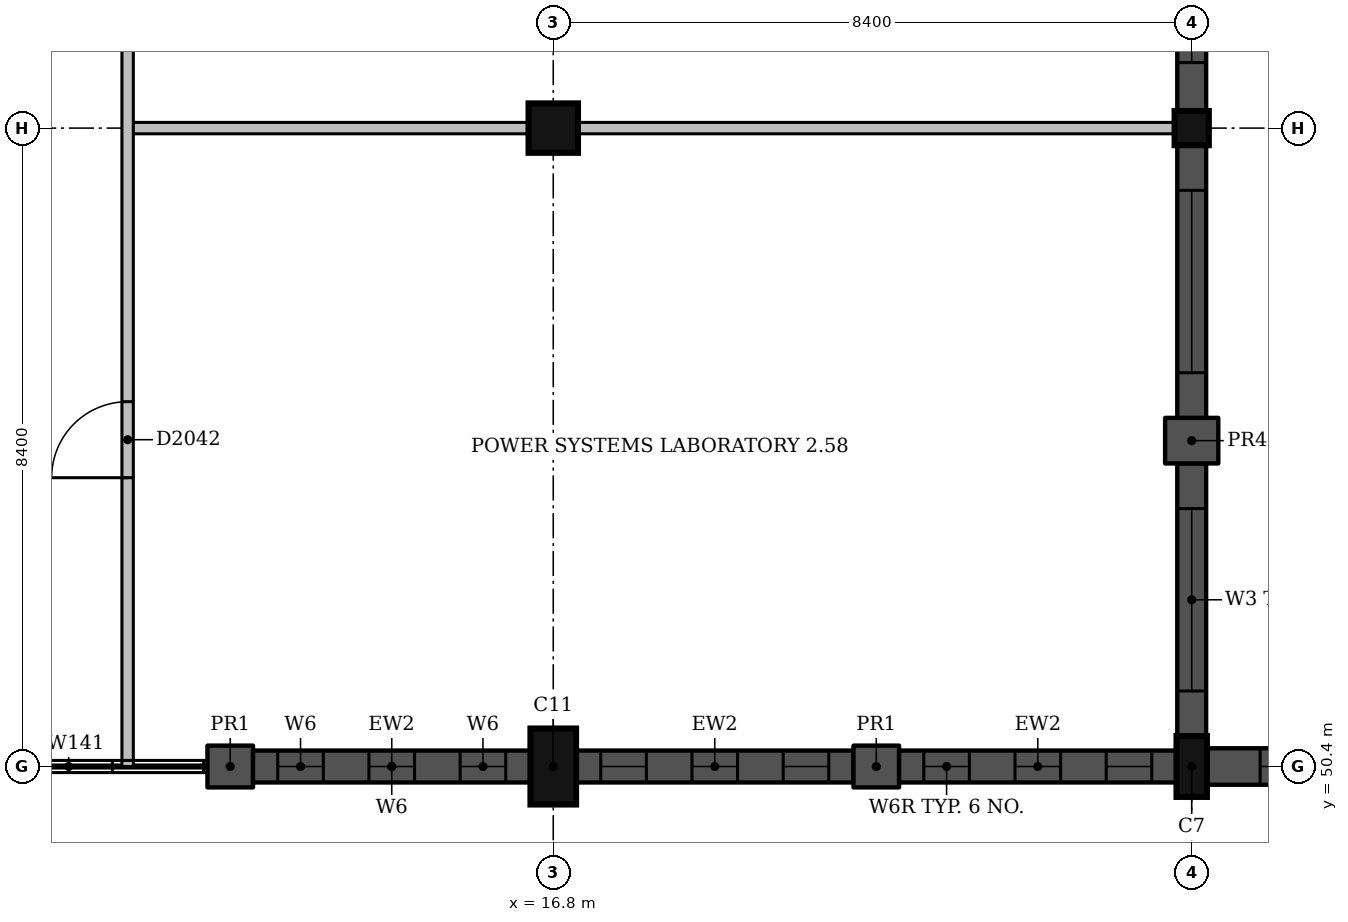
"""IFC4 building model, lengths in metres.
Left out: names, types, materials, properties, quantities, classifications, styles, units other than length and angle.
Written with IfcOpenShell. Run it as: python <this file> out.ifc"""

import sys

from ifc_helpers import new_model, si_unit, direction, frame, frame_2d, origin, origin_2d, place, context, subcontext, project, spatial, rectangle, extrude, element, fill, save


model = new_model("IFC4")
c1 = context("Model", 3, precision=1e-05, world=origin(), true_north=direction((0.0, 1.0)))
c2 = subcontext(c1, "Body", "Model", "MODEL_VIEW")
j1 = project(units=[si_unit("LENGTHUNIT", "METRE"), si_unit("PLANEANGLEUNIT", "RADIAN")], contexts=[c1])
p1 = place(None, origin())
s1 = spatial("IfcSite", under=j1, at=p1, CompositionType="ELEMENT")
p2 = place(p1, origin())
s2 = spatial("IfcBuilding", under=s1, at=p2, CompositionType="ELEMENT")
p3 = place(p2, frame((0.0, 0.0, 9.0)))
s3 = spatial("IfcBuildingStorey", under=s2, at=p3, CompositionType="ELEMENT", Elevation=9.0)
p4 = place(p3, frame((16.8, 50.4, 0.0), z_axis=(0.0, 0.0, 1.0), x_axis=(1.0, 0.0, 0.0)))
e1 = element("IfcColumn", 1, at=p4, inside=s3, PredefinedType="COLUMN", context=c2, shape_type="SweptSolid", body=[
    extrude(rectangle(XDim=0.6, YDim=1.0, at=origin_2d()), origin(), (0.0, 0.0, 1.0), 4.5),
])
p5 = place(p3, frame((25.2, 50.4, 0.0), z_axis=(0.0, 0.0, 1.0), x_axis=(1.0, 0.0, 0.0)))
e2 = element("IfcColumn", 2, at=p5, inside=s3, PredefinedType="COLUMN", context=c2, shape_type="SweptSolid", body=[
    extrude(rectangle(XDim=0.4, YDim=0.8, at=origin_2d()), origin(), (0.0, 0.0, 1.0), 4.5),
])
p6 = place(p3, frame((16.8, 58.8, 0.0), z_axis=(0.0, 0.0, 1.0), x_axis=(1.0, 0.0, 0.0)))
e3 = element("IfcColumn", 3, at=p6, inside=s3, PredefinedType="COLUMN", context=c2, shape_type="SweptSolid", body=[
    extrude(rectangle(XDim=0.65, YDim=0.65, at=origin_2d()), origin(), (0.0, 0.0, 1.0), 4.5),
])
p7 = place(p3, frame((25.2, 58.8, 0.0), z_axis=(0.0, 0.0, 1.0), x_axis=(1.0, 0.0, 0.0)))
e4 = element("IfcColumn", 4, at=p7, inside=s3, PredefinedType="COLUMN", context=c2, shape_type="SweptSolid", body=[
    extrude(rectangle(XDim=0.45, YDim=0.45, at=origin_2d()), origin(), (0.0, 0.0, 1.0), 4.5),
])
p8 = place(p3, frame((25.2, 50.8, 0.0), z_axis=(0.0, 0.0, 1.0), x_axis=(0.0, 1.0, 0.0)))
e5 = element("IfcWall", 5, at=p8, inside=s3, PredefinedType="SOLIDWALL", context=c2, shape_type="SweptSolid", body=[
    extrude(rectangle(XDim=3.587, YDim=0.38, at=frame_2d((1.794, 0.0))), origin(), (0.0, 0.0, 1.0), 4.2),
])
p9 = place(p8, frame((0.594, 0.0, 1.2)))
e6 = element("IfcOpeningElement", 6, at=p9, cuts=e5, PredefinedType="OPENING", context=c2, shape_type="SweptSolid", body=[
    extrude(rectangle(XDim=2.4, YDim=1.5, at=frame_2d((1.2, 0.75))), frame((0.0, 0.2, 0.0), z_axis=(0.0, -1.0, 0.0), x_axis=(1.0, 0.0, 0.0)), (0.0, 0.0, 1.0), 0.4),
])
p10 = place(p3, frame((25.2, 54.387, 0.0), z_axis=(0.0, 0.0, 1.0), x_axis=(0.0, 1.0, 0.0)))
e7 = element("IfcWall", 7, at=p10, inside=s3, PredefinedType="SOLIDWALL", context=c2, shape_type="SweptSolid", body=[
    extrude(rectangle(XDim=0.6, YDim=0.7, at=frame_2d((0.3, 0.0))), origin(), (0.0, 0.0, 1.0), 4.2),
])
p11 = place(p3, frame((25.2, 54.988, 0.0), z_axis=(0.0, 0.0, 1.0), x_axis=(0.0, 1.0, 0.0)))
e8 = element("IfcWall", 8, at=p11, inside=s3, PredefinedType="SOLIDWALL", context=c2, shape_type="SweptSolid", body=[
    extrude(rectangle(XDim=3.587, YDim=0.38, at=frame_2d((1.794, 0.0))), origin(), (0.0, 0.0, 1.0), 4.2),
])
p12 = place(p11, frame((0.594, 0.0, 1.2)))
e9 = element("IfcOpeningElement", 9, at=p12, cuts=e8, PredefinedType="OPENING", context=c2, shape_type="SweptSolid", body=[
    extrude(rectangle(XDim=2.4, YDim=1.5, at=frame_2d((1.2, 0.75))), frame((0.0, 0.2, 0.0), z_axis=(0.0, -1.0, 0.0), x_axis=(1.0, 0.0, 0.0)), (0.0, 0.0, 1.0), 0.4),
])
p13 = place(p3, frame((25.2, 59.025, 0.0), z_axis=(0.0, 0.0, 1.0), x_axis=(0.0, 1.0, 0.0)))
e10 = element("IfcWall", 10, at=p13, inside=s3, PredefinedType="SOLIDWALL", context=c2, shape_type="SweptSolid", body=[
    extrude(rectangle(XDim=3.675, YDim=0.38, at=frame_2d((1.837, 0.0))), origin(), (0.0, 0.0, 1.0), 3.35),
])
p14 = place(p13, frame((0.637, 0.0, 1.2)))
e11 = element("IfcOpeningElement", 11, at=p14, cuts=e10, PredefinedType="OPENING", context=c2, shape_type="SweptSolid", body=[
    extrude(rectangle(XDim=2.4, YDim=1.5, at=frame_2d((1.2, 0.75))), frame((0.0, 0.2, 0.0), z_axis=(0.0, -1.0, 0.0), x_axis=(1.0, 0.0, 0.0)), (0.0, 0.0, 1.0), 0.4),
])
p15 = place(p3, frame((12.25, 50.4, 0.0), z_axis=(0.0, 0.0, 1.0), x_axis=(1.0, 0.0, 0.0)))
e12 = element("IfcWall", 12, at=p15, inside=s3, PredefinedType="SOLIDWALL", context=c2, shape_type="SweptSolid", body=[
    extrude(rectangle(XDim=0.6, YDim=0.55, at=frame_2d((0.3, 0.0))), origin(), (0.0, 0.0, 1.0), 4.2),
])
p16 = place(p3, frame((12.85, 50.4, 0.0), z_axis=(0.0, 0.0, 1.0), x_axis=(1.0, 0.0, 0.0)))
e13 = element("IfcWall", 13, at=p16, inside=s3, PredefinedType="SOLIDWALL", context=c2, shape_type="SweptSolid", body=[
    extrude(rectangle(XDim=3.65, YDim=0.42, at=frame_2d((1.825, 0.0))), origin(), (0.0, 0.0, 1.0), 4.2),
])
p17 = place(p16, frame((0.325, 0.0, 1.0)))
e14 = element("IfcOpeningElement", 14, at=p17, cuts=e13, PredefinedType="OPENING", context=c2, shape_type="SweptSolid", body=[
    extrude(rectangle(XDim=0.6, YDim=2.1, at=frame_2d((0.3, 1.05))), frame((0.0, 0.22, 0.0), z_axis=(0.0, -1.0, 0.0), x_axis=(1.0, 0.0, 0.0)), (0.0, 0.0, 1.0), 0.44),
])
p18 = place(p16, frame((1.525, 0.0, 1.0)))
e15 = element("IfcOpeningElement", 15, at=p18, cuts=e13, PredefinedType="OPENING", context=c2, shape_type="SweptSolid", body=[
    extrude(rectangle(XDim=0.6, YDim=2.1, at=frame_2d((0.3, 1.05))), frame((0.0, 0.22, 0.0), z_axis=(0.0, -1.0, 0.0), x_axis=(1.0, 0.0, 0.0)), (0.0, 0.0, 1.0), 0.44),
])
p19 = place(p16, frame((2.725, 0.0, 1.0)))
e16 = element("IfcOpeningElement", 16, at=p19, cuts=e13, PredefinedType="OPENING", context=c2, shape_type="SweptSolid", body=[
    extrude(rectangle(XDim=0.6, YDim=2.1, at=frame_2d((0.3, 1.05))), frame((0.0, 0.22, 0.0), z_axis=(0.0, -1.0, 0.0), x_axis=(1.0, 0.0, 0.0)), (0.0, 0.0, 1.0), 0.44),
])
p20 = place(p3, frame((17.1, 50.4, 0.0), z_axis=(0.0, 0.0, 1.0), x_axis=(1.0, 0.0, 0.0)))
e17 = element("IfcWall", 17, at=p20, inside=s3, PredefinedType="SOLIDWALL", context=c2, shape_type="SweptSolid", body=[
    extrude(rectangle(XDim=3.65, YDim=0.42, at=frame_2d((1.825, 0.0))), origin(), (0.0, 0.0, 1.0), 3.35),
])
p21 = place(p20, frame((0.325, 0.0, 1.0)))
e18 = element("IfcOpeningElement", 18, at=p21, cuts=e17, PredefinedType="OPENING", context=c2, shape_type="SweptSolid", body=[
    extrude(rectangle(XDim=0.6, YDim=1.8, at=frame_2d((0.3, 0.9))), frame((0.0, 0.22, 0.0), z_axis=(0.0, -1.0, 0.0), x_axis=(1.0, 0.0, 0.0)), (0.0, 0.0, 1.0), 0.44),
])
p22 = place(p20, frame((1.525, 0.0, 1.0)))
e19 = element("IfcOpeningElement", 19, at=p22, cuts=e17, PredefinedType="OPENING", context=c2, shape_type="SweptSolid", body=[
    extrude(rectangle(XDim=0.6, YDim=1.8, at=frame_2d((0.3, 0.9))), frame((0.0, 0.22, 0.0), z_axis=(0.0, -1.0, 0.0), x_axis=(1.0, 0.0, 0.0)), (0.0, 0.0, 1.0), 0.44),
])
p23 = place(p20, frame((2.725, 0.0, 1.0)))
e20 = element("IfcOpeningElement", 20, at=p23, cuts=e17, PredefinedType="OPENING", context=c2, shape_type="SweptSolid", body=[
    extrude(rectangle(XDim=0.6, YDim=1.8, at=frame_2d((0.3, 0.9))), frame((0.0, 0.22, 0.0), z_axis=(0.0, -1.0, 0.0), x_axis=(1.0, 0.0, 0.0)), (0.0, 0.0, 1.0), 0.44),
])
p24 = place(p3, frame((20.75, 50.4, 0.0), z_axis=(0.0, 0.0, 1.0), x_axis=(1.0, 0.0, 0.0)))
e21 = element("IfcWall", 21, at=p24, inside=s3, PredefinedType="SOLIDWALL", context=c2, shape_type="SweptSolid", body=[
    extrude(rectangle(XDim=0.6, YDim=0.55, at=frame_2d((0.3, 0.0))), origin(), (0.0, 0.0, 1.0), 3.35),
])
p25 = place(p3, frame((21.35, 50.4, 0.0), z_axis=(0.0, 0.0, 1.0), x_axis=(1.0, 0.0, 0.0)))
e22 = element("IfcWall", 22, at=p25, inside=s3, PredefinedType="SOLIDWALL", context=c2, shape_type="SweptSolid", body=[
    extrude(rectangle(XDim=3.65, YDim=0.42, at=frame_2d((1.825, 0.0))), origin(), (0.0, 0.0, 1.0), 3.35),
])
p26 = place(p25, frame((0.325, 0.0, 1.0)))
e23 = element("IfcOpeningElement", 23, at=p26, cuts=e22, PredefinedType="OPENING", context=c2, shape_type="SweptSolid", body=[
    extrude(rectangle(XDim=0.6, YDim=1.8, at=frame_2d((0.3, 0.9))), frame((0.0, 0.22, 0.0), z_axis=(0.0, -1.0, 0.0), x_axis=(1.0, 0.0, 0.0)), (0.0, 0.0, 1.0), 0.44),
])
p27 = place(p25, frame((1.525, 0.0, 1.0)))
e24 = element("IfcOpeningElement", 24, at=p27, cuts=e22, PredefinedType="OPENING", context=c2, shape_type="SweptSolid", body=[
    extrude(rectangle(XDim=0.6, YDim=1.8, at=frame_2d((0.3, 0.9))), frame((0.0, 0.22, 0.0), z_axis=(0.0, -1.0, 0.0), x_axis=(1.0, 0.0, 0.0)), (0.0, 0.0, 1.0), 0.44),
])
p28 = place(p25, frame((2.725, 0.0, 1.0)))
e25 = element("IfcOpeningElement", 25, at=p28, cuts=e22, PredefinedType="OPENING", context=c2, shape_type="SweptSolid", body=[
    extrude(rectangle(XDim=0.6, YDim=1.8, at=frame_2d((0.3, 0.9))), frame((0.0, 0.22, 0.0), z_axis=(0.0, -1.0, 0.0), x_axis=(1.0, 0.0, 0.0)), (0.0, 0.0, 1.0), 0.44),
])
p29 = place(p3, frame((29.2, 50.4, 0.0), z_axis=(0.0, 0.0, 1.0), x_axis=(-1.0, 0.0, 0.0)))
e26 = element("IfcWall", 26, at=p29, inside=s3, PredefinedType="SOLIDWALL", context=c2, shape_type="SweptSolid", body=[
    extrude(rectangle(XDim=3.8, YDim=0.48, at=frame_2d((1.9, 0.0))), origin(), (0.0, 0.0, 1.0), 4.5),
])
p30 = place(p29, frame((0.7, 0.0, 2.4)))
e27 = element("IfcOpeningElement", 27, at=p30, cuts=e26, PredefinedType="OPENING", context=c2, shape_type="SweptSolid", body=[
    extrude(rectangle(XDim=2.4, YDim=1.5, at=frame_2d((1.2, 0.75))), frame((0.0, 0.25, 0.0), z_axis=(0.0, -1.0, 0.0), x_axis=(1.0, 0.0, 0.0)), (0.0, 0.0, 1.0), 0.5),
])
p31 = place(p3, frame((11.2, 58.8, 0.0), z_axis=(0.0, 0.0, 1.0), x_axis=(1.0, 0.0, 0.0)))
e28 = element("IfcWall", 28, at=p31, inside=s3, PredefinedType="PARTITIONING", context=c2, shape_type="SweptSolid", body=[
    extrude(rectangle(XDim=5.275, YDim=0.15, at=frame_2d((2.638, 0.0))), origin(), (0.0, 0.0, 1.0), 3.4),
])
p32 = place(p3, frame((17.125, 58.8, 0.0), z_axis=(0.0, 0.0, 1.0), x_axis=(1.0, 0.0, 0.0)))
e29 = element("IfcWall", 29, at=p32, inside=s3, PredefinedType="PARTITIONING", context=c2, shape_type="SweptSolid", body=[
    extrude(rectangle(XDim=7.85, YDim=0.15, at=frame_2d((3.925, 0.0))), origin(), (0.0, 0.0, 1.0), 3.4),
])
p33 = place(p3, frame((11.2, 50.4, 0.0), z_axis=(0.0, 0.0, 1.0), x_axis=(0.0, 1.0, 0.0)))
e30 = element("IfcWall", 30, at=p33, inside=s3, PredefinedType="PARTITIONING", context=c2, shape_type="SweptSolid", body=[
    extrude(rectangle(XDim=25.2, YDim=0.15, at=frame_2d((12.6, 0.0))), origin(), (0.0, 0.0, 1.0), 2.37),
])
p34 = place(p33, frame((3.8, 0.0, 0.0)))
e31 = element("IfcOpeningElement", 31, at=p34, cuts=e30, PredefinedType="OPENING", context=c2, shape_type="SweptSolid", body=[
    extrude(rectangle(XDim=1.0, YDim=2.1, at=frame_2d((0.5, 1.05))), frame((0.0, 0.085, 0.0), z_axis=(0.0, -1.0, 0.0), x_axis=(1.0, 0.0, 0.0)), (0.0, 0.0, 1.0), 0.17),
])
p35 = place(p33, frame((12.2, 0.0, 0.0)))
e32 = element("IfcOpeningElement", 32, at=p35, cuts=e30, PredefinedType="OPENING", context=c2, shape_type="SweptSolid", body=[
    extrude(rectangle(XDim=1.0, YDim=2.1, at=frame_2d((0.5, 1.05))), frame((0.0, 0.085, 0.0), z_axis=(0.0, -1.0, 0.0), x_axis=(1.0, 0.0, 0.0)), (0.0, 0.0, 1.0), 0.17),
])
p36 = place(p9, origin())
e33 = element("IfcWindow", 33, at=p36, inside=s3, PartitioningType="SINGLE_PANEL", PredefinedType="WINDOW", context=c2, shape_type="SweptSolid", body=[
    extrude(rectangle(XDim=2.4, YDim=1.5, at=frame_2d((1.2, 0.75))), frame((0.0, 0.15, 0.0), z_axis=(0.0, -1.0, 0.0), x_axis=(1.0, 0.0, 0.0)), (0.0, 0.0, 1.0), 0.06),
])
fill(e6, e33)
p37 = place(p12, origin())
e34 = element("IfcWindow", 34, at=p37, inside=s3, PartitioningType="SINGLE_PANEL", PredefinedType="WINDOW", context=c2, shape_type="SweptSolid", body=[
    extrude(rectangle(XDim=2.4, YDim=1.5, at=frame_2d((1.2, 0.75))), frame((0.0, 0.15, 0.0), z_axis=(0.0, -1.0, 0.0), x_axis=(1.0, 0.0, 0.0)), (0.0, 0.0, 1.0), 0.06),
])
fill(e9, e34)
p38 = place(p14, origin())
e35 = element("IfcWindow", 35, at=p38, inside=s3, PartitioningType="SINGLE_PANEL", PredefinedType="WINDOW", context=c2, shape_type="SweptSolid", body=[
    extrude(rectangle(XDim=2.4, YDim=1.5, at=frame_2d((1.2, 0.75))), frame((0.0, 0.15, 0.0), z_axis=(0.0, -1.0, 0.0), x_axis=(1.0, 0.0, 0.0)), (0.0, 0.0, 1.0), 0.06),
])
fill(e11, e35)
p39 = place(p17, origin())
e36 = element("IfcWindow", 36, at=p39, inside=s3, PartitioningType="SINGLE_PANEL", PredefinedType="WINDOW", context=c2, shape_type="SweptSolid", body=[
    extrude(rectangle(XDim=0.6, YDim=2.1, at=frame_2d((0.3, 1.05))), frame((0.0, 0.15, 0.0), z_axis=(0.0, -1.0, 0.0), x_axis=(1.0, 0.0, 0.0)), (0.0, 0.0, 1.0), 0.06),
])
fill(e14, e36)
p40 = place(p18, origin())
e37 = element("IfcWindow", 37, at=p40, inside=s3, PartitioningType="SINGLE_PANEL", PredefinedType="WINDOW", context=c2, shape_type="SweptSolid", body=[
    extrude(rectangle(XDim=0.6, YDim=2.1, at=frame_2d((0.3, 1.05))), frame((0.0, 0.15, 0.0), z_axis=(0.0, -1.0, 0.0), x_axis=(1.0, 0.0, 0.0)), (0.0, 0.0, 1.0), 0.06),
])
fill(e15, e37)
p41 = place(p19, origin())
e38 = element("IfcWindow", 38, at=p41, inside=s3, PartitioningType="SINGLE_PANEL", PredefinedType="WINDOW", context=c2, shape_type="SweptSolid", body=[
    extrude(rectangle(XDim=0.6, YDim=2.1, at=frame_2d((0.3, 1.05))), frame((0.0, 0.15, 0.0), z_axis=(0.0, -1.0, 0.0), x_axis=(1.0, 0.0, 0.0)), (0.0, 0.0, 1.0), 0.06),
])
fill(e16, e38)
p42 = place(p21, origin())
e39 = element("IfcWindow", 39, at=p42, inside=s3, PartitioningType="SINGLE_PANEL", PredefinedType="WINDOW", context=c2, shape_type="SweptSolid", body=[
    extrude(rectangle(XDim=0.6, YDim=1.8, at=frame_2d((0.3, 0.9))), frame((0.0, 0.15, 0.0), z_axis=(0.0, -1.0, 0.0), x_axis=(1.0, 0.0, 0.0)), (0.0, 0.0, 1.0), 0.06),
])
fill(e18, e39)
p43 = place(p22, origin())
e40 = element("IfcWindow", 40, at=p43, inside=s3, PartitioningType="SINGLE_PANEL", PredefinedType="WINDOW", context=c2, shape_type="SweptSolid", body=[
    extrude(rectangle(XDim=0.6, YDim=1.8, at=frame_2d((0.3, 0.9))), frame((0.0, 0.15, 0.0), z_axis=(0.0, -1.0, 0.0), x_axis=(1.0, 0.0, 0.0)), (0.0, 0.0, 1.0), 0.06),
])
fill(e19, e40)
p44 = place(p23, origin())
e41 = element("IfcWindow", 41, at=p44, inside=s3, PartitioningType="SINGLE_PANEL", PredefinedType="WINDOW", context=c2, shape_type="SweptSolid", body=[
    extrude(rectangle(XDim=0.6, YDim=1.8, at=frame_2d((0.3, 0.9))), frame((0.0, 0.15, 0.0), z_axis=(0.0, -1.0, 0.0), x_axis=(1.0, 0.0, 0.0)), (0.0, 0.0, 1.0), 0.06),
])
fill(e20, e41)
p45 = place(p26, origin())
e42 = element("IfcWindow", 42, at=p45, inside=s3, PartitioningType="SINGLE_PANEL", PredefinedType="WINDOW", context=c2, shape_type="SweptSolid", body=[
    extrude(rectangle(XDim=0.6, YDim=1.8, at=frame_2d((0.3, 0.9))), frame((0.0, 0.15, 0.0), z_axis=(0.0, -1.0, 0.0), x_axis=(1.0, 0.0, 0.0)), (0.0, 0.0, 1.0), 0.06),
])
fill(e23, e42)
p46 = place(p27, origin())
e43 = element("IfcWindow", 43, at=p46, inside=s3, PartitioningType="SINGLE_PANEL", PredefinedType="WINDOW", context=c2, shape_type="SweptSolid", body=[
    extrude(rectangle(XDim=0.6, YDim=1.8, at=frame_2d((0.3, 0.9))), frame((0.0, 0.15, 0.0), z_axis=(0.0, -1.0, 0.0), x_axis=(1.0, 0.0, 0.0)), (0.0, 0.0, 1.0), 0.06),
])
fill(e24, e43)
p47 = place(p28, origin())
e44 = element("IfcWindow", 44, at=p47, inside=s3, PartitioningType="SINGLE_PANEL", PredefinedType="WINDOW", context=c2, shape_type="SweptSolid", body=[
    extrude(rectangle(XDim=0.6, YDim=1.8, at=frame_2d((0.3, 0.9))), frame((0.0, 0.15, 0.0), z_axis=(0.0, -1.0, 0.0), x_axis=(1.0, 0.0, 0.0)), (0.0, 0.0, 1.0), 0.06),
])
fill(e25, e44)
p48 = place(p30, origin())
e45 = element("IfcWindow", 45, at=p48, inside=s3, PartitioningType="SINGLE_PANEL", PredefinedType="WINDOW", context=c2, shape_type="SweptSolid", body=[
    extrude(rectangle(XDim=2.4, YDim=1.5, at=frame_2d((1.2, 0.75))), frame((0.0, 0.12, 0.0), z_axis=(0.0, -1.0, 0.0), x_axis=(1.0, 0.0, 0.0)), (0.0, 0.0, 1.0), 0.06),
])
fill(e27, e45)
p49 = place(p34, origin())
e46 = element("IfcDoor", 46, at=p49, inside=s3, OperationType="SINGLE_SWING_LEFT", PredefinedType="DOOR", context=c2, shape_type="SweptSolid", body=[
    extrude(rectangle(XDim=1.0, YDim=2.1, at=frame_2d((0.5, 1.05))), frame((0.0, 0.025, 0.0), z_axis=(0.0, -1.0, 0.0), x_axis=(1.0, 0.0, 0.0)), (0.0, 0.0, 1.0), 0.05),
])
fill(e31, e46)
save(model, sys.argv[1])
